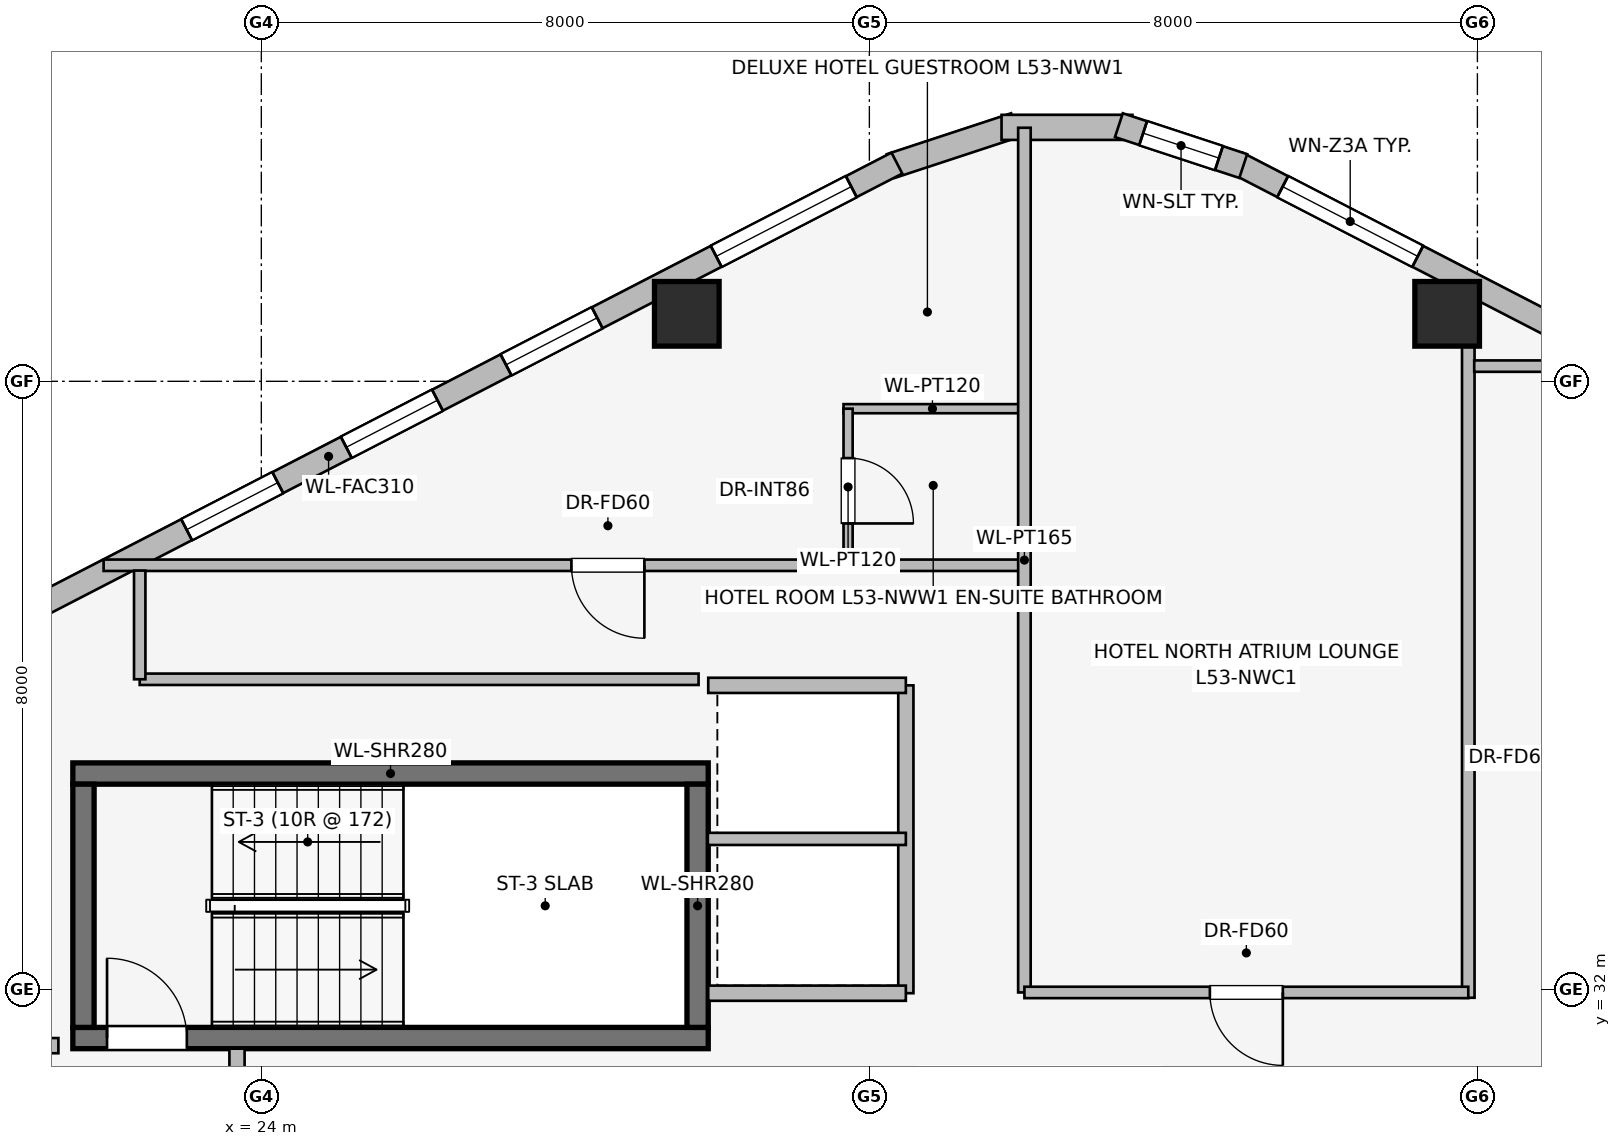
"""IFC4 building model, lengths in metres.
Left out: names, types, materials, properties, quantities, classifications, styles, units other than length and angle.
Written with IfcOpenShell. Run it as: python <this file> out.ifc"""

import sys

from ifc_helpers import new_model, si_unit, direction, frame, frame_2d, origin, origin_2d, place, context, subcontext, project, spatial, rectangle, extrude, element, fill, save


model = new_model("IFC4")
c1 = context("Model", 3, precision=1e-05, world=origin(), true_north=direction((0.0, 1.0)))
c2 = subcontext(c1, "Body", "Model", "MODEL_VIEW")
j1 = project(units=[si_unit("LENGTHUNIT", "METRE"), si_unit("PLANEANGLEUNIT", "RADIAN")], contexts=[c1])
p1 = place(None, origin())
s1 = spatial("IfcSite", under=j1, at=p1, CompositionType="ELEMENT")
p2 = place(p1, origin())
s2 = spatial("IfcBuilding", under=s1, at=p2, CompositionType="ELEMENT")
p3 = place(p2, frame((0.0, 0.0, 196.45)))
s3 = spatial("IfcBuildingStorey", under=s2, at=p3, CompositionType="ELEMENT", Elevation=196.45)
p4 = place(p3, frame((21.52, 31.36, 0.0), z_axis=(0.0, 0.0, 1.0), x_axis=(1.0, 0.0, 0.0)))
e1 = element("IfcWall", 1, at=p4, inside=s3, PredefinedType="SHEAR", context=c2, shape_type="SweptSolid", body=[
    extrude(rectangle(XDim=8.36, YDim=0.28, at=frame_2d((4.18, 0.0))), origin(), (0.0, 0.0, 1.0), 3.45),
])
p5 = place(p4, frame((0.45, 0.0, 0.0)))
e2 = element("IfcOpeningElement", 2, at=p5, cuts=e1, PredefinedType="OPENING", context=c2, shape_type="SweptSolid", body=[
    extrude(rectangle(XDim=1.05, YDim=2.0, at=frame_2d((0.525, 1.0))), frame((0.0, 0.15, 0.0), z_axis=(0.0, -1.0, 0.0), x_axis=(1.0, 0.0, 0.0)), (0.0, 0.0, 1.0), 0.3),
])
p6 = place(p3, frame((29.88, 34.84, 0.0), z_axis=(0.0, 0.0, 1.0), x_axis=(-1.0, 0.0, 0.0)))
e3 = element("IfcWall", 3, at=p6, inside=s3, PredefinedType="SHEAR", context=c2, shape_type="SweptSolid", body=[
    extrude(rectangle(XDim=8.36, YDim=0.28, at=frame_2d((4.18, 0.0))), origin(), (0.0, 0.0, 1.0), 3.45),
])
for number, where, z_axis, x_axis in (
    (4, (21.66, 34.7, 0.0), (0.0, 0.0, 1.0), (0.0, -1.0, 0.0)),
    (5, (29.74, 31.5, 0.0), (0.0, 0.0, 1.0), (0.0, 1.0, 0.0)),
):
    element("IfcWall", number, at=place(p3, frame(where, z_axis=z_axis, x_axis=x_axis)), inside=s3, PredefinedType="SHEAR", context=c2, shape_type="SweptSolid", body=[
        extrude(rectangle(XDim=3.2, YDim=0.28, at=frame_2d((1.6, 0.0))), origin(), (0.0, 0.0, 1.0), 3.45),
    ])
for number, where, z_axis, x_axis in (
    (6, (39.602, 40.888, 0.0), (0.0, 0.0, 1.0), (1.0, 0.0, 0.0)),
    (7, (29.598, 40.888, 0.0), (0.0, 0.0, 1.0), (1.0, 0.0, 0.0)),
):
    element("IfcColumn", number, at=place(p3, frame(where, z_axis=z_axis, x_axis=x_axis)), inside=s3, PredefinedType="COLUMN", context=c2, shape_type="SweptSolid", body=[
        extrude(rectangle(XDim=0.85, YDim=0.85, at=origin_2d()), origin(), (0.0, 0.0, 1.0), 3.45),
    ])
p7 = place(p3, frame((36.838, 42.871, 0.0), z_axis=(0.0, 0.0, 1.0), x_axis=(0.888626188278, -0.458632202867, 0.0)))
e8 = element("IfcWall", 8, at=p7, inside=s3, PredefinedType="STANDARD", context=c2, shape_type="SweptSolid", body=[
    extrude(rectangle(XDim=16.828, YDim=0.31, at=frame_2d((8.414, 0.0))), origin(), (0.0, 0.0, 1.0), 3.19),
])
p8 = place(p7, frame((0.675, 0.0, 0.75)))
e9 = element("IfcOpeningElement", 9, at=p8, cuts=e8, PredefinedType="OPENING", context=c2, shape_type="SweptSolid", body=[
    extrude(rectangle(XDim=2.0, YDim=1.5, at=frame_2d((1.0, 0.75))), frame((0.0, 0.165, 0.0), z_axis=(0.0, -1.0, 0.0), x_axis=(1.0, 0.0, 0.0)), (0.0, 0.0, 1.0), 0.33),
])
p9 = place(p7, frame((6.273, 0.0, 0.75)))
e10 = element("IfcOpeningElement", 10, at=p9, cuts=e8, PredefinedType="OPENING", context=c2, shape_type="SweptSolid", body=[
    extrude(rectangle(XDim=1.35, YDim=1.45, at=frame_2d((0.675, 0.725))), frame((0.0, 0.165, 0.0), z_axis=(0.0, -1.0, 0.0), x_axis=(1.0, 0.0, 0.0)), (0.0, 0.0, 1.0), 0.33),
])
p10 = place(p7, frame((8.653, 0.0, 0.75)))
e11 = element("IfcOpeningElement", 11, at=p10, cuts=e8, PredefinedType="OPENING", context=c2, shape_type="SweptSolid", body=[
    extrude(rectangle(XDim=1.35, YDim=1.45, at=frame_2d((0.675, 0.725))), frame((0.0, 0.165, 0.0), z_axis=(0.0, -1.0, 0.0), x_axis=(1.0, 0.0, 0.0)), (0.0, 0.0, 1.0), 0.33),
])
p11 = place(p7, frame((11.032, 0.0, 0.75)))
e12 = element("IfcOpeningElement", 12, at=p11, cuts=e8, PredefinedType="OPENING", context=c2, shape_type="SweptSolid", body=[
    extrude(rectangle(XDim=1.35, YDim=1.45, at=frame_2d((0.675, 0.725))), frame((0.0, 0.165, 0.0), z_axis=(0.0, -1.0, 0.0), x_axis=(1.0, 0.0, 0.0)), (0.0, 0.0, 1.0), 0.33),
])
p12 = place(p7, frame((14.153, 0.0, 0.75)))
e13 = element("IfcOpeningElement", 13, at=p12, cuts=e8, PredefinedType="OPENING", context=c2, shape_type="SweptSolid", body=[
    extrude(rectangle(XDim=2.0, YDim=1.5, at=frame_2d((1.0, 0.75))), frame((0.0, 0.165, 0.0), z_axis=(0.0, -1.0, 0.0), x_axis=(1.0, 0.0, 0.0)), (0.0, 0.0, 1.0), 0.33),
])
p13 = place(p3, frame((32.281, 42.832, 0.0), z_axis=(0.0, 0.0, 1.0), x_axis=(0.949937416267, 0.312440242569, 0.0)))
e14 = element("IfcWall", 14, at=p13, inside=s3, PredefinedType="STANDARD", context=c2, shape_type="SweptSolid", body=[
    extrude(rectangle(XDim=1.722, YDim=0.33, at=frame_2d((0.861, 0.0))), origin(), (0.0, 0.0, 1.0), 3.19),
])
p14 = place(p3, frame((33.739, 43.341, 0.0), z_axis=(0.0, 0.0, 1.0), x_axis=(1.0, 0.0, 0.0)))
e15 = element("IfcWall", 15, at=p14, inside=s3, PredefinedType="STANDARD", context=c2, shape_type="SweptSolid", body=[
    extrude(rectangle(XDim=1.722, YDim=0.33, at=frame_2d((0.861, 0.0))), origin(), (0.0, 0.0, 1.0), 3.19),
])
p15 = place(p3, frame((35.283, 43.37, 0.0), z_axis=(0.0, 0.0, 1.0), x_axis=(0.949937416267, -0.312440242569, 0.0)))
e16 = element("IfcWall", 16, at=p15, inside=s3, PredefinedType="STANDARD", context=c2, shape_type="SweptSolid", body=[
    extrude(rectangle(XDim=1.722, YDim=0.33, at=frame_2d((0.861, 0.0))), origin(), (0.0, 0.0, 1.0), 3.19),
])
p16 = place(p15, frame((0.336, 0.0, 0.75)))
e17 = element("IfcOpeningElement", 17, at=p16, cuts=e16, PredefinedType="OPENING", context=c2, shape_type="SweptSolid", body=[
    extrude(rectangle(XDim=1.05, YDim=1.4, at=frame_2d((0.525, 0.7))), frame((0.0, 0.175, 0.0), z_axis=(0.0, -1.0, 0.0), x_axis=(1.0, 0.0, 0.0)), (0.0, 0.0, 1.0), 0.35),
])
p17 = place(p3, frame((17.408, 35.153, 0.0), z_axis=(0.0, 0.0, 1.0), x_axis=(0.888626188278, 0.458632202867, 0.0)))
e18 = element("IfcWall", 18, at=p17, inside=s3, PredefinedType="STANDARD", context=c2, shape_type="SweptSolid", body=[
    extrude(rectangle(XDim=16.828, YDim=0.31, at=frame_2d((8.414, 0.0))), origin(), (0.0, 0.0, 1.0), 3.19),
])
p18 = place(p17, frame((0.675, 0.0, 0.75)))
e19 = element("IfcOpeningElement", 19, at=p18, cuts=e18, PredefinedType="OPENING", context=c2, shape_type="SweptSolid", body=[
    extrude(rectangle(XDim=2.0, YDim=1.5, at=frame_2d((1.0, 0.75))), frame((0.0, 0.165, 0.0), z_axis=(0.0, -1.0, 0.0), x_axis=(1.0, 0.0, 0.0)), (0.0, 0.0, 1.0), 0.33),
])
p19 = place(p17, frame((6.312, 0.0, 0.75)))
e20 = element("IfcOpeningElement", 20, at=p19, cuts=e18, PredefinedType="OPENING", context=c2, shape_type="SweptSolid", body=[
    extrude(rectangle(XDim=1.35, YDim=1.45, at=frame_2d((0.675, 0.725))), frame((0.0, 0.165, 0.0), z_axis=(0.0, -1.0, 0.0), x_axis=(1.0, 0.0, 0.0)), (0.0, 0.0, 1.0), 0.33),
])
p20 = place(p17, frame((8.676, 0.0, 0.75)))
e21 = element("IfcOpeningElement", 21, at=p20, cuts=e18, PredefinedType="OPENING", context=c2, shape_type="SweptSolid", body=[
    extrude(rectangle(XDim=1.35, YDim=1.45, at=frame_2d((0.675, 0.725))), frame((0.0, 0.165, 0.0), z_axis=(0.0, -1.0, 0.0), x_axis=(1.0, 0.0, 0.0)), (0.0, 0.0, 1.0), 0.33),
])
p21 = place(p17, frame((11.041, 0.0, 0.75)))
e22 = element("IfcOpeningElement", 22, at=p21, cuts=e18, PredefinedType="OPENING", context=c2, shape_type="SweptSolid", body=[
    extrude(rectangle(XDim=1.35, YDim=1.45, at=frame_2d((0.675, 0.725))), frame((0.0, 0.165, 0.0), z_axis=(0.0, -1.0, 0.0), x_axis=(1.0, 0.0, 0.0)), (0.0, 0.0, 1.0), 0.33),
])
p22 = place(p17, frame((14.153, 0.0, 0.75)))
e23 = element("IfcOpeningElement", 23, at=p22, cuts=e18, PredefinedType="OPENING", context=c2, shape_type="SweptSolid", body=[
    extrude(rectangle(XDim=2.0, YDim=1.5, at=frame_2d((1.0, 0.75))), frame((0.0, 0.165, 0.0), z_axis=(0.0, -1.0, 0.0), x_axis=(1.0, 0.0, 0.0)), (0.0, 0.0, 1.0), 0.33),
])
p23 = place(p3, frame((23.68, 25.68, 0.0), z_axis=(0.0, 0.0, 1.0), x_axis=(0.0, 1.0, 0.0)))
e24 = element("IfcWall", 24, at=p23, inside=s3, PredefinedType="PARTITIONING", context=c2, shape_type="SweptSolid", body=[
    extrude(rectangle(XDim=5.54, YDim=0.2, at=frame_2d((2.77, 0.0))), origin(), (0.0, 0.0, 1.0), 3.19),
])
p24 = place(p23, frame((1.8, 0.0, 0.0)))
e25 = element("IfcOpeningElement", 25, at=p24, cuts=e24, PredefinedType="OPENING", context=c2, shape_type="SweptSolid", body=[
    extrude(rectangle(XDim=1.05, YDim=2.0, at=frame_2d((0.525, 1.0))), frame((0.0, 0.11, 0.0), z_axis=(0.0, -1.0, 0.0), x_axis=(1.0, 0.0, 0.0)), (0.0, 0.0, 1.0), 0.22),
])
p25 = place(p3, frame((21.33, 31.26, 0.0), z_axis=(0.0, 0.0, 1.0), x_axis=(-1.0, 0.0, 0.0)))
e26 = element("IfcWall", 26, at=p25, inside=s3, PredefinedType="PARTITIONING", context=c2, shape_type="SweptSolid", body=[
    extrude(rectangle(XDim=1.68, YDim=0.2, at=frame_2d((0.84, 0.0))), origin(), (0.0, 0.0, 1.0), 3.19),
])
p26 = place(p3, frame((32.48, 31.95, 0.0), z_axis=(0.0, 0.0, 1.0), x_axis=(0.0, 1.0, 0.0)))
e27 = element("IfcWall", 27, at=p26, inside=s3, PredefinedType="PARTITIONING", context=c2, shape_type="SweptSolid", body=[
    extrude(rectangle(XDim=4.05, YDim=0.2, at=frame_2d((2.025, 0.0))), origin(), (0.0, 0.0, 1.0), 3.19),
])
for number, where, z_axis, x_axis in (
    (28, (29.88, 36.0, 0.0), (0.0, 0.0, 1.0), (1.0, 0.0, 0.0)),
    (29, (32.48, 31.95, 0.0), (0.0, 0.0, 1.0), (-1.0, 0.0, 0.0)),
):
    element("IfcWall", number, at=place(p3, frame(where, z_axis=z_axis, x_axis=x_axis)), inside=s3, PredefinedType="PARTITIONING", context=c2, shape_type="SweptSolid", body=[
        extrude(rectangle(XDim=2.6, YDim=0.2, at=frame_2d((1.3, 0.0))), origin(), (0.0, 0.0, 1.0), 3.19),
    ])
p27 = place(p3, frame((29.875, 33.98, 0.0), z_axis=(0.0, 0.0, 1.0), x_axis=(1.0, 0.0, 0.0)))
e30 = element("IfcWall", 30, at=p27, inside=s3, PredefinedType="PARTITIONING", context=c2, shape_type="SweptSolid", body=[
    extrude(rectangle(XDim=2.605, YDim=0.16, at=frame_2d((1.302, 0.0))), origin(), (0.0, 0.0, 1.0), 2.582),
])
p28 = place(p3, frame((34.0, 39.64, 0.0), z_axis=(0.0, 0.0, 1.0), x_axis=(-1.0, 0.0, 0.0)))
e31 = element("IfcWall", 31, at=p28, inside=s3, PredefinedType="PARTITIONING", context=c2, shape_type="SweptSolid", body=[
    extrude(rectangle(XDim=2.34, YDim=0.12, at=frame_2d((1.17, 0.0))), origin(), (0.0, 0.0, 1.0), 3.19),
])
p29 = place(p3, frame((31.72, 39.64, 0.0), z_axis=(0.0, 0.0, 1.0), x_axis=(0.0, -1.0, 0.0)))
e32 = element("IfcWall", 32, at=p29, inside=s3, PredefinedType="PARTITIONING", context=c2, shape_type="SweptSolid", body=[
    extrude(rectangle(XDim=2.06, YDim=0.12, at=frame_2d((1.03, 0.0))), origin(), (0.0, 0.0, 1.0), 3.19),
])
p30 = place(p29, frame((0.65, 0.0, 0.0)))
e33 = element("IfcOpeningElement", 33, at=p30, cuts=e32, PredefinedType="OPENING", context=c2, shape_type="SweptSolid", body=[
    extrude(rectangle(XDim=0.86, YDim=2.0, at=frame_2d((0.43, 1.0))), frame((0.0, 0.07, 0.0), z_axis=(0.0, -1.0, 0.0), x_axis=(1.0, 0.0, 0.0)), (0.0, 0.0, 1.0), 0.14),
])
p31 = place(p3, frame((34.0, 37.58, 0.0), z_axis=(0.0, 0.0, 1.0), x_axis=(-1.0, 0.0, 0.0)))
e34 = element("IfcWall", 34, at=p31, inside=s3, PredefinedType="PARTITIONING", context=c2, shape_type="SweptSolid", body=[
    extrude(rectangle(XDim=12.075, YDim=0.15, at=frame_2d((6.038, 0.0))), origin(), (0.0, 0.0, 1.0), 2.582),
])
p32 = place(p31, frame((4.96, 0.0, 0.0)))
e35 = element("IfcOpeningElement", 35, at=p32, cuts=e34, PredefinedType="OPENING", context=c2, shape_type="SweptSolid", body=[
    extrude(rectangle(XDim=0.96, YDim=2.0, at=frame_2d((0.48, 1.0))), frame((0.0, 0.085, 0.0), z_axis=(0.0, -1.0, 0.0), x_axis=(1.0, 0.0, 0.0)), (0.0, 0.0, 1.0), 0.17),
])
p33 = place(p3, frame((34.04, 31.96, 0.0), z_axis=(0.0, 0.0, 1.0), x_axis=(0.0, 1.0, 0.0)))
e36 = element("IfcWall", 36, at=p33, inside=s3, PredefinedType="PARTITIONING", context=c2, shape_type="SweptSolid", body=[
    extrude(rectangle(XDim=11.376, YDim=0.165, at=frame_2d((5.688, 0.0))), origin(), (0.0, 0.0, 1.0), 3.19),
])
p34 = place(p3, frame((39.88, 31.89, 0.0), z_axis=(0.0, 0.0, 1.0), x_axis=(0.0, 1.0, 0.0)))
e37 = element("IfcWall", 37, at=p34, inside=s3, PredefinedType="PARTITIONING", context=c2, shape_type="SweptSolid", body=[
    extrude(rectangle(XDim=9.406, YDim=0.165, at=frame_2d((4.703, 0.0))), origin(), (0.0, 0.0, 1.0), 2.497),
])
p35 = place(p3, frame((39.88, 31.96, 0.0), z_axis=(0.0, 0.0, 1.0), x_axis=(-1.0, 0.0, 0.0)))
e38 = element("IfcWall", 38, at=p35, inside=s3, PredefinedType="PARTITIONING", context=c2, shape_type="SweptSolid", body=[
    extrude(rectangle(XDim=5.84, YDim=0.15, at=frame_2d((2.92, 0.0))), origin(), (0.0, 0.0, 1.0), 3.19),
])
p36 = place(p35, frame((2.44, 0.0, 0.0)))
e39 = element("IfcOpeningElement", 39, at=p36, cuts=e38, PredefinedType="OPENING", context=c2, shape_type="SweptSolid", body=[
    extrude(rectangle(XDim=0.96, YDim=2.0, at=frame_2d((0.48, 1.0))), frame((0.0, 0.085, 0.0), z_axis=(0.0, -1.0, 0.0), x_axis=(1.0, 0.0, 0.0)), (0.0, 0.0, 1.0), 0.17),
])
p37 = place(p3, frame((29.753, 36.08, 0.0), z_axis=(0.0, 0.0, 1.0), x_axis=(-1.0, 0.0, 0.0)))
e40 = element("IfcWall", 40, at=p37, inside=s3, PredefinedType="PARTITIONING", context=c2, shape_type="SweptSolid", body=[
    extrude(rectangle(XDim=7.353, YDim=0.15, at=frame_2d((3.677, 0.0))), origin(), (0.0, 0.0, 1.0), 3.19),
])
p38 = place(p3, frame((22.4, 36.08, 0.0), z_axis=(0.0, 0.0, 1.0), x_axis=(0.0, 1.0, 0.0)))
e41 = element("IfcWall", 41, at=p38, inside=s3, PredefinedType="PARTITIONING", context=c2, shape_type="SweptSolid", body=[
    extrude(rectangle(XDim=1.43, YDim=0.15, at=frame_2d((0.715, 0.0))), origin(), (0.0, 0.0, 1.0), 3.19),
])
p39 = place(p3, frame((39.958, 40.2, 0.0), z_axis=(0.0, 0.0, 1.0), x_axis=(1.0, 0.0, 0.0)))
e42 = element("IfcWall", 42, at=p39, inside=s3, PredefinedType="PARTITIONING", context=c2, shape_type="SweptSolid", body=[
    extrude(rectangle(XDim=1.512, YDim=0.15, at=frame_2d((0.756, 0.0))), origin(), (0.0, 0.0, 1.0), 3.19),
])
p40 = place(p8, origin())
e43 = element("IfcWindow", 43, at=p40, inside=s3, PartitioningType="SINGLE_PANEL", PredefinedType="WINDOW", context=c2, shape_type="SweptSolid", body=[
    extrude(rectangle(XDim=2.0, YDim=1.5, at=frame_2d((1.0, 0.75))), frame((0.0, 0.03, 0.0), z_axis=(0.0, -1.0, 0.0), x_axis=(1.0, 0.0, 0.0)), (0.0, 0.0, 1.0), 0.06),
])
fill(e9, e43)
p41 = place(p16, origin())
e44 = element("IfcWindow", 44, at=p41, inside=s3, PartitioningType="SINGLE_PANEL", PredefinedType="WINDOW", context=c2, shape_type="SweptSolid", body=[
    extrude(rectangle(XDim=1.05, YDim=1.4, at=frame_2d((0.525, 0.7))), frame((0.0, 0.03, 0.0), z_axis=(0.0, -1.0, 0.0), x_axis=(1.0, 0.0, 0.0)), (0.0, 0.0, 1.0), 0.06),
])
fill(e17, e44)
p42 = place(p19, origin())
e45 = element("IfcWindow", 45, at=p42, inside=s3, PartitioningType="SINGLE_PANEL", PredefinedType="WINDOW", context=c2, shape_type="SweptSolid", body=[
    extrude(rectangle(XDim=1.35, YDim=1.45, at=frame_2d((0.675, 0.725))), frame((0.0, 0.03, 0.0), z_axis=(0.0, -1.0, 0.0), x_axis=(1.0, 0.0, 0.0)), (0.0, 0.0, 1.0), 0.06),
])
fill(e20, e45)
p43 = place(p20, origin())
e46 = element("IfcWindow", 46, at=p43, inside=s3, PartitioningType="SINGLE_PANEL", PredefinedType="WINDOW", context=c2, shape_type="SweptSolid", body=[
    extrude(rectangle(XDim=1.35, YDim=1.45, at=frame_2d((0.675, 0.725))), frame((0.0, 0.03, 0.0), z_axis=(0.0, -1.0, 0.0), x_axis=(1.0, 0.0, 0.0)), (0.0, 0.0, 1.0), 0.06),
])
fill(e21, e46)
p44 = place(p21, origin())
e47 = element("IfcWindow", 47, at=p44, inside=s3, PartitioningType="SINGLE_PANEL", PredefinedType="WINDOW", context=c2, shape_type="SweptSolid", body=[
    extrude(rectangle(XDim=1.35, YDim=1.45, at=frame_2d((0.675, 0.725))), frame((0.0, 0.03, 0.0), z_axis=(0.0, -1.0, 0.0), x_axis=(1.0, 0.0, 0.0)), (0.0, 0.0, 1.0), 0.06),
])
fill(e22, e47)
p45 = place(p22, origin())
e48 = element("IfcWindow", 48, at=p45, inside=s3, PartitioningType="SINGLE_PANEL", PredefinedType="WINDOW", context=c2, shape_type="SweptSolid", body=[
    extrude(rectangle(XDim=2.0, YDim=1.5, at=frame_2d((1.0, 0.75))), frame((0.0, 0.03, 0.0), z_axis=(0.0, -1.0, 0.0), x_axis=(1.0, 0.0, 0.0)), (0.0, 0.0, 1.0), 0.06),
])
fill(e23, e48)
p46 = place(p5, origin())
e49 = element("IfcDoor", 49, at=p46, inside=s3, OperationType="SINGLE_SWING_LEFT", PredefinedType="DOOR", context=c2, shape_type="SweptSolid", body=[
    extrude(rectangle(XDim=1.05, YDim=2.0, at=frame_2d((0.525, 1.0))), frame((0.0, 0.025, 0.0), z_axis=(0.0, -1.0, 0.0), x_axis=(1.0, 0.0, 0.0)), (0.0, 0.0, 1.0), 0.05),
])
fill(e2, e49)
p47 = place(p30, origin())
e50 = element("IfcDoor", 50, at=p47, inside=s3, OperationType="SINGLE_SWING_RIGHT", PredefinedType="DOOR", context=c2, shape_type="SweptSolid", body=[
    extrude(rectangle(XDim=0.86, YDim=2.0, at=frame_2d((0.43, 1.0))), frame((0.0, 0.025, 0.0), z_axis=(0.0, -1.0, 0.0), x_axis=(1.0, 0.0, 0.0)), (0.0, 0.0, 1.0), 0.05),
])
fill(e33, e50)
p48 = place(p32, origin())
e51 = element("IfcDoor", 51, at=p48, inside=s3, OperationType="SINGLE_SWING_LEFT", PredefinedType="DOOR", context=c2, shape_type="SweptSolid", body=[
    extrude(rectangle(XDim=0.96, YDim=2.0, at=frame_2d((0.48, 1.0))), frame((0.0, 0.025, 0.0), z_axis=(0.0, -1.0, 0.0), x_axis=(1.0, 0.0, 0.0)), (0.0, 0.0, 1.0), 0.05),
])
fill(e35, e51)
p49 = place(p36, origin())
e52 = element("IfcDoor", 52, at=p49, inside=s3, OperationType="SINGLE_SWING_LEFT", PredefinedType="DOOR", context=c2, shape_type="SweptSolid", body=[
    extrude(rectangle(XDim=0.96, YDim=2.0, at=frame_2d((0.48, 1.0))), frame((0.0, 0.025, 0.0), z_axis=(0.0, -1.0, 0.0), x_axis=(1.0, 0.0, 0.0)), (0.0, 0.0, 1.0), 0.05),
])
fill(e39, e52)
save(model, sys.argv[1])
